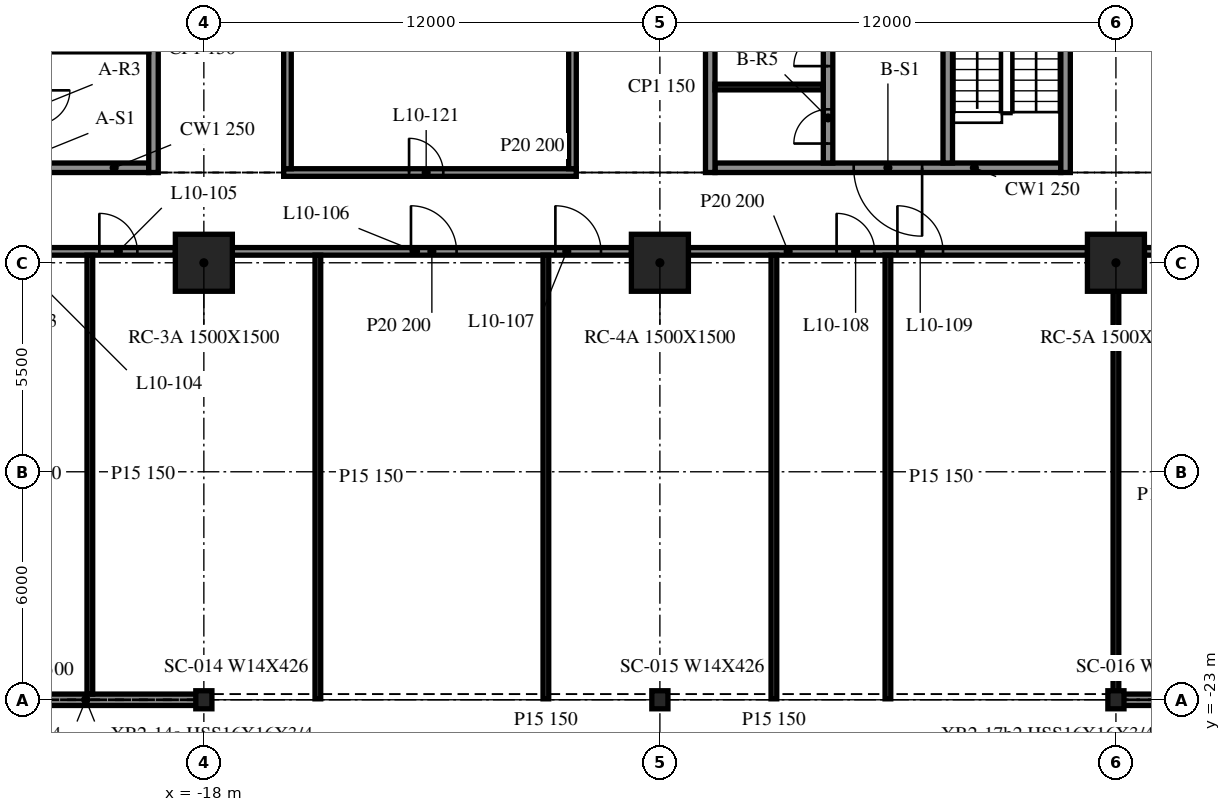
"""IFC4 building model, lengths in metres.
Left out: names, types, materials, properties, quantities, classifications, styles, units other than length and angle.
Written with IfcOpenShell. Run it as: python <this file> out.ifc"""

import sys

from ifc_helpers import new_model, si_unit, direction, frame, frame_2d, origin, origin_2d, place, context, subcontext, project, spatial, rectangle, i_section, extrude, element, fill, save


model = new_model("IFC4")
c1 = context("Model", 3, precision=1e-05, world=origin(), true_north=direction((0.0, 1.0)))
c2 = subcontext(c1, "Body", "Model", "MODEL_VIEW")
j1 = project(units=[si_unit("LENGTHUNIT", "METRE"), si_unit("PLANEANGLEUNIT", "RADIAN")], contexts=[c1])
p1 = place(None, origin())
s1 = spatial("IfcSite", under=j1, at=p1, CompositionType="ELEMENT")
p2 = place(p1, origin())
s2 = spatial("IfcBuilding", under=s1, at=p2, CompositionType="ELEMENT")
p3 = place(p2, frame((0.0, 0.0, 46.0)))
s3 = spatial("IfcBuildingStorey", under=s2, at=p3, CompositionType="ELEMENT", Elevation=46.0)
for number, where, z_axis, x_axis in (
    (1, (-18.0, -11.5, -0.34), (0.0, 0.0, 1.0), (1.0, 0.0, 0.0)),
    (2, (-6.0, -11.5, -0.34), (0.0, 0.0, 1.0), (1.0, 0.0, 0.0)),
    (3, (6.0, -11.5, -0.34), (0.0, 0.0, 1.0), (1.0, 0.0, 0.0)),
):
    element("IfcColumn", number, at=place(p3, frame(where, z_axis=z_axis, x_axis=x_axis)), inside=s3, PredefinedType="COLUMN", context=c2, shape_type="SweptSolid", body=[
        extrude(rectangle(XDim=1.5, YDim=1.5, at=origin_2d()), origin(), (0.0, 0.0, 1.0), 4.3),
    ])
for number, where, z_axis, x_axis in (
    (4, (-18.0, -23.0, -0.34), (0.0, 0.0, 1.0), (1.0, 0.0, 0.0)),
    (5, (-6.0, -23.0, -0.34), (0.0, 0.0, 1.0), (1.0, 0.0, 0.0)),
    (6, (6.0, -23.0, -0.34), (0.0, 0.0, 1.0), (1.0, 0.0, 0.0)),
):
    element("IfcColumn", number, at=place(p3, frame(where, z_axis=z_axis, x_axis=x_axis)), inside=s3, PredefinedType="COLUMN", context=c2, shape_type="SweptSolid", body=[
        extrude(i_section(OverallWidth=0.424, OverallDepth=0.475, WebThickness=0.048, FlangeThickness=0.077, at=origin_2d()), origin(), (0.0, 0.0, 1.0), 4.3),
    ])
for number, where, z_axis, x_axis in (
    (7, (-29.976, -23.0, 0.0), (0.0, 0.0, 1.0), (1.0, 0.0, 0.0)),
    (8, (6.024, -23.0, 0.0), (0.0, 0.0, 1.0), (1.0, 0.0, 0.0)),
):
    element("IfcWall", number, at=place(p3, frame(where, z_axis=z_axis, x_axis=x_axis)), inside=s3, PredefinedType="NOTDEFINED", context=c2, shape_type="SweptSolid", body=[
        extrude(rectangle(XDim=11.952, YDim=0.3, at=frame_2d((5.976, 0.0))), origin(), (0.0, 0.0, 1.0), 3.203),
    ])
p4 = place(p3, frame((-19.325, -9.125, 0.0), z_axis=(0.0, 0.0, 1.0), x_axis=(0.0, 1.0, 0.0)))
e9 = element("IfcWall", 9, at=p4, inside=s3, PredefinedType="SOLIDWALL", context=c2, shape_type="SweptSolid", body=[
    extrude(rectangle(XDim=24.25, YDim=0.25, at=frame_2d((12.125, 0.0))), origin(), (0.0, 0.0, 1.0), 3.96),
])
p5 = place(p3, frame((-19.45, -9.0, 0.0), z_axis=(0.0, 0.0, 1.0), x_axis=(-1.0, 0.0, 0.0)))
e10 = element("IfcWall", 10, at=p5, inside=s3, PredefinedType="SOLIDWALL", context=c2, shape_type="SweptSolid", body=[
    extrude(rectangle(XDim=9.1, YDim=0.25, at=frame_2d((4.55, 0.0))), origin(), (0.0, 0.0, 1.0), 3.96),
])
p6 = place(p5, frame((3.65, 0.0, 0.0)))
e11 = element("IfcOpeningElement", 11, at=p6, cuts=e10, PredefinedType="OPENING", context=c2, shape_type="SweptSolid", body=[
    extrude(rectangle(XDim=1.8, YDim=2.1, at=frame_2d((0.9, 1.05))), frame((0.0, 0.135, 0.0), z_axis=(0.0, -1.0, 0.0), x_axis=(1.0, 0.0, 0.0)), (0.0, 0.0, 1.0), 0.27),
])
for number, where, z_axis, x_axis in (
    (12, (-4.675, 15.125, 0.0), (0.0, 0.0, 1.0), (0.0, -1.0, 0.0)),
    (13, (4.675, -9.125, 0.0), (0.0, 0.0, 1.0), (0.0, 1.0, 0.0)),
):
    element("IfcWall", number, at=place(p3, frame(where, z_axis=z_axis, x_axis=x_axis)), inside=s3, PredefinedType="SOLIDWALL", context=c2, shape_type="SweptSolid", body=[
        extrude(rectangle(XDim=24.25, YDim=0.25, at=frame_2d((12.125, 0.0))), origin(), (0.0, 0.0, 1.0), 3.96),
    ])
p7 = place(p3, frame((4.55, -9.0, 0.0), z_axis=(0.0, 0.0, 1.0), x_axis=(-1.0, 0.0, 0.0)))
e14 = element("IfcWall", 14, at=p7, inside=s3, PredefinedType="SOLIDWALL", context=c2, shape_type="SweptSolid", body=[
    extrude(rectangle(XDim=9.1, YDim=0.25, at=frame_2d((4.55, 0.0))), origin(), (0.0, 0.0, 1.0), 3.96),
])
p8 = place(p7, frame((3.65, 0.0, 0.0)))
e15 = element("IfcOpeningElement", 15, at=p8, cuts=e14, PredefinedType="OPENING", context=c2, shape_type="SweptSolid", body=[
    extrude(rectangle(XDim=1.8, YDim=2.1, at=frame_2d((0.9, 1.05))), frame((0.0, 0.135, 0.0), z_axis=(0.0, -1.0, 0.0), x_axis=(1.0, 0.0, 0.0)), (0.0, 0.0, 1.0), 0.27),
])
p9 = place(p3, frame((-1.575, -8.875, 0.0), z_axis=(0.0, 0.0, 1.0), x_axis=(0.0, 1.0, 0.0)))
e16 = element("IfcWall", 16, at=p9, inside=s3, PredefinedType="SOLIDWALL", context=c2, shape_type="SweptSolid", body=[
    extrude(rectangle(XDim=23.75, YDim=0.25, at=frame_2d((11.875, 0.0))), origin(), (0.0, 0.0, 1.0), 3.96),
])
p10 = place(p9, frame((7.84, 0.0, 0.0)))
e17 = element("IfcOpeningElement", 17, at=p10, cuts=e16, PredefinedType="OPENING", context=c2, shape_type="SweptSolid", body=[
    extrude(rectangle(XDim=0.9, YDim=2.1, at=frame_2d((0.45, 1.05))), frame((0.0, 0.135, 0.0), z_axis=(0.0, -1.0, 0.0), x_axis=(1.0, 0.0, 0.0)), (0.0, 0.0, 1.0), 0.27),
])
p11 = place(p9, frame((11.479, 0.0, 0.0)))
e18 = element("IfcOpeningElement", 18, at=p11, cuts=e16, PredefinedType="OPENING", context=c2, shape_type="SweptSolid", body=[
    extrude(rectangle(XDim=0.9, YDim=2.1, at=frame_2d((0.45, 1.05))), frame((0.0, 0.135, 0.0), z_axis=(0.0, -1.0, 0.0), x_axis=(1.0, 0.0, 0.0)), (0.0, 0.0, 1.0), 0.27),
])
p12 = place(p9, frame((15.064, 0.0, 0.0)))
e19 = element("IfcOpeningElement", 19, at=p12, cuts=e16, PredefinedType="OPENING", context=c2, shape_type="SweptSolid", body=[
    extrude(rectangle(XDim=0.9, YDim=2.1, at=frame_2d((0.45, 1.05))), frame((0.0, 0.135, 0.0), z_axis=(0.0, -1.0, 0.0), x_axis=(1.0, 0.0, 0.0)), (0.0, 0.0, 1.0), 0.27),
])
p13 = place(p9, frame((0.512, 0.0, 0.0)))
e20 = element("IfcOpeningElement", 20, at=p13, cuts=e16, PredefinedType="OPENING", context=c2, shape_type="SweptSolid", body=[
    extrude(rectangle(XDim=0.9, YDim=2.1, at=frame_2d((0.45, 1.05))), frame((0.0, 0.135, 0.0), z_axis=(0.0, -1.0, 0.0), x_axis=(1.0, 0.0, 0.0)), (0.0, 0.0, 1.0), 0.27),
])
p14 = place(p9, frame((2.55, 0.0, 0.0)))
e21 = element("IfcOpeningElement", 21, at=p14, cuts=e16, PredefinedType="OPENING", context=c2, shape_type="SweptSolid", body=[
    extrude(rectangle(XDim=0.9, YDim=2.1, at=frame_2d((0.45, 1.05))), frame((0.0, 0.135, 0.0), z_axis=(0.0, -1.0, 0.0), x_axis=(1.0, 0.0, 0.0)), (0.0, 0.0, 1.0), 0.27),
])
p15 = place(p9, frame((4.587, 0.0, 0.0)))
e22 = element("IfcOpeningElement", 22, at=p15, cuts=e16, PredefinedType="OPENING", context=c2, shape_type="SweptSolid", body=[
    extrude(rectangle(XDim=0.9, YDim=2.1, at=frame_2d((0.45, 1.05))), frame((0.0, 0.135, 0.0), z_axis=(0.0, -1.0, 0.0), x_axis=(1.0, 0.0, 0.0)), (0.0, 0.0, 1.0), 0.27),
])
p16 = place(p9, frame((19.262, 0.0, 0.0)))
e23 = element("IfcOpeningElement", 23, at=p16, cuts=e16, PredefinedType="OPENING", context=c2, shape_type="SweptSolid", body=[
    extrude(rectangle(XDim=0.9, YDim=2.1, at=frame_2d((0.45, 1.05))), frame((0.0, 0.135, 0.0), z_axis=(0.0, -1.0, 0.0), x_axis=(1.0, 0.0, 0.0)), (0.0, 0.0, 1.0), 0.27),
])
p17 = place(p9, frame((22.337, 0.0, 0.0)))
e24 = element("IfcOpeningElement", 24, at=p17, cuts=e16, PredefinedType="OPENING", context=c2, shape_type="SweptSolid", body=[
    extrude(rectangle(XDim=0.9, YDim=2.1, at=frame_2d((0.45, 1.05))), frame((0.0, 0.135, 0.0), z_axis=(0.0, -1.0, 0.0), x_axis=(1.0, 0.0, 0.0)), (0.0, 0.0, 1.0), 0.27),
])
p18 = place(p3, frame((1.575, -8.875, 0.0), z_axis=(0.0, 0.0, 1.0), x_axis=(0.0, 1.0, 0.0)))
e25 = element("IfcWall", 25, at=p18, inside=s3, PredefinedType="SOLIDWALL", context=c2, shape_type="SweptSolid", body=[
    extrude(rectangle(XDim=6.25, YDim=0.25, at=frame_2d((3.125, 0.0))), origin(), (0.0, 0.0, 1.0), 3.96),
])
p19 = place(p18, frame((4.85, 0.0, 0.0)))
e26 = element("IfcOpeningElement", 26, at=p19, cuts=e25, PredefinedType="OPENING", context=c2, shape_type="SweptSolid", body=[
    extrude(rectangle(XDim=1.0, YDim=2.1, at=frame_2d((0.5, 1.05))), frame((0.0, 0.135, 0.0), z_axis=(0.0, -1.0, 0.0), x_axis=(1.0, 0.0, 0.0)), (0.0, 0.0, 1.0), 0.27),
])
p20 = place(p3, frame((-4.55, -6.875, 0.0), z_axis=(0.0, 0.0, 1.0), x_axis=(1.0, 0.0, 0.0)))
e27 = element("IfcWall", 27, at=p20, inside=s3, PredefinedType="PARTITIONING", context=c2, shape_type="SweptSolid", body=[
    extrude(rectangle(XDim=2.85, YDim=0.15, at=frame_2d((1.425, 0.0))), origin(), (0.0, 0.0, 1.0), 3.96),
])
p21 = place(p3, frame((-29.25, -11.2, 0.0), z_axis=(0.0, 0.0, 1.0), x_axis=(1.0, 0.0, 0.0)))
e28 = element("IfcWall", 28, at=p21, inside=s3, PredefinedType="PARTITIONING", context=c2, shape_type="SweptSolid", body=[
    extrude(rectangle(XDim=10.5, YDim=0.2, at=frame_2d((5.25, 0.0))), origin(), (0.0, 0.0, 1.0), 3.96),
])
p22 = place(p21, frame((3.7, 0.0, 0.0)))
e29 = element("IfcOpeningElement", 29, at=p22, cuts=e28, PredefinedType="OPENING", context=c2, shape_type="SweptSolid", body=[
    extrude(rectangle(XDim=1.2, YDim=2.1, at=frame_2d((0.6, 1.05))), frame((0.0, 0.11, 0.0), z_axis=(0.0, -1.0, 0.0), x_axis=(1.0, 0.0, 0.0)), (0.0, 0.0, 1.0), 0.22),
])
p23 = place(p21, frame((5.5, 0.0, 0.0)))
e30 = element("IfcOpeningElement", 30, at=p23, cuts=e28, PredefinedType="OPENING", context=c2, shape_type="SweptSolid", body=[
    extrude(rectangle(XDim=1.2, YDim=2.1, at=frame_2d((0.6, 1.05))), frame((0.0, 0.11, 0.0), z_axis=(0.0, -1.0, 0.0), x_axis=(1.0, 0.0, 0.0)), (0.0, 0.0, 1.0), 0.22),
])
p24 = place(p21, frame((8.5, 0.0, 0.0)))
e31 = element("IfcOpeningElement", 31, at=p24, cuts=e28, PredefinedType="OPENING", context=c2, shape_type="SweptSolid", body=[
    extrude(rectangle(XDim=1.0, YDim=2.1, at=frame_2d((0.5, 1.05))), frame((0.0, 0.11, 0.0), z_axis=(0.0, -1.0, 0.0), x_axis=(1.0, 0.0, 0.0)), (0.0, 0.0, 1.0), 0.22),
])
p25 = place(p3, frame((-17.25, -11.2, 0.0), z_axis=(0.0, 0.0, 1.0), x_axis=(1.0, 0.0, 0.0)))
e32 = element("IfcWall", 32, at=p25, inside=s3, PredefinedType="PARTITIONING", context=c2, shape_type="SweptSolid", body=[
    extrude(rectangle(XDim=10.5, YDim=0.2, at=frame_2d((5.25, 0.0))), origin(), (0.0, 0.0, 1.0), 3.96),
])
p26 = place(p25, frame((4.7, 0.0, 0.0)))
e33 = element("IfcOpeningElement", 33, at=p26, cuts=e32, PredefinedType="OPENING", context=c2, shape_type="SweptSolid", body=[
    extrude(rectangle(XDim=1.2, YDim=2.1, at=frame_2d((0.6, 1.05))), frame((0.0, 0.11, 0.0), z_axis=(0.0, -1.0, 0.0), x_axis=(1.0, 0.0, 0.0)), (0.0, 0.0, 1.0), 0.22),
])
p27 = place(p25, frame((8.5, 0.0, 0.0)))
e34 = element("IfcOpeningElement", 34, at=p27, cuts=e32, PredefinedType="OPENING", context=c2, shape_type="SweptSolid", body=[
    extrude(rectangle(XDim=1.2, YDim=2.1, at=frame_2d((0.6, 1.05))), frame((0.0, 0.11, 0.0), z_axis=(0.0, -1.0, 0.0), x_axis=(1.0, 0.0, 0.0)), (0.0, 0.0, 1.0), 0.22),
])
p28 = place(p3, frame((-5.25, -11.2, 0.0), z_axis=(0.0, 0.0, 1.0), x_axis=(1.0, 0.0, 0.0)))
e35 = element("IfcWall", 35, at=p28, inside=s3, PredefinedType="PARTITIONING", context=c2, shape_type="SweptSolid", body=[
    extrude(rectangle(XDim=10.5, YDim=0.2, at=frame_2d((5.25, 0.0))), origin(), (0.0, 0.0, 1.0), 3.96),
])
p29 = place(p28, frame((3.9, 0.0, 0.0)))
e36 = element("IfcOpeningElement", 36, at=p29, cuts=e35, PredefinedType="OPENING", context=c2, shape_type="SweptSolid", body=[
    extrude(rectangle(XDim=1.0, YDim=2.1, at=frame_2d((0.5, 1.05))), frame((0.0, 0.11, 0.0), z_axis=(0.0, -1.0, 0.0), x_axis=(1.0, 0.0, 0.0)), (0.0, 0.0, 1.0), 0.22),
])
p30 = place(p28, frame((5.5, 0.0, 0.0)))
e37 = element("IfcOpeningElement", 37, at=p30, cuts=e35, PredefinedType="OPENING", context=c2, shape_type="SweptSolid", body=[
    extrude(rectangle(XDim=1.2, YDim=2.1, at=frame_2d((0.6, 1.05))), frame((0.0, 0.11, 0.0), z_axis=(0.0, -1.0, 0.0), x_axis=(1.0, 0.0, 0.0)), (0.0, 0.0, 1.0), 0.22),
])
p31 = place(p3, frame((6.75, -11.2, 0.0), z_axis=(0.0, 0.0, 1.0), x_axis=(1.0, 0.0, 0.0)))
e38 = element("IfcWall", 38, at=p31, inside=s3, PredefinedType="PARTITIONING", context=c2, shape_type="SweptSolid", body=[
    extrude(rectangle(XDim=10.5, YDim=0.2, at=frame_2d((5.25, 0.0))), origin(), (0.0, 0.0, 1.0), 3.96),
])
p32 = place(p31, frame((3.7, 0.0, 0.0)))
e39 = element("IfcOpeningElement", 39, at=p32, cuts=e38, PredefinedType="OPENING", context=c2, shape_type="SweptSolid", body=[
    extrude(rectangle(XDim=1.2, YDim=2.1, at=frame_2d((0.6, 1.05))), frame((0.0, 0.11, 0.0), z_axis=(0.0, -1.0, 0.0), x_axis=(1.0, 0.0, 0.0)), (0.0, 0.0, 1.0), 0.22),
])
p33 = place(p31, frame((5.5, 0.0, 0.0)))
e40 = element("IfcOpeningElement", 40, at=p33, cuts=e38, PredefinedType="OPENING", context=c2, shape_type="SweptSolid", body=[
    extrude(rectangle(XDim=1.0, YDim=2.1, at=frame_2d((0.5, 1.05))), frame((0.0, 0.11, 0.0), z_axis=(0.0, -1.0, 0.0), x_axis=(1.0, 0.0, 0.0)), (0.0, 0.0, 1.0), 0.22),
])
p34 = place(p3, frame((-15.9, -9.125, 0.0), z_axis=(0.0, 0.0, 1.0), x_axis=(1.0, 0.0, 0.0)))
e41 = element("IfcWall", 41, at=p34, inside=s3, PredefinedType="PARTITIONING", context=c2, shape_type="SweptSolid", body=[
    extrude(rectangle(XDim=7.7, YDim=0.2, at=frame_2d((3.85, 0.0))), origin(), (0.0, 0.0, 1.0), 3.96),
])
p35 = place(p34, frame((3.3, 0.0, 0.0)))
e42 = element("IfcOpeningElement", 42, at=p35, cuts=e41, PredefinedType="OPENING", context=c2, shape_type="SweptSolid", body=[
    extrude(rectangle(XDim=0.9, YDim=2.1, at=frame_2d((0.45, 1.05))), frame((0.0, 0.11, 0.0), z_axis=(0.0, -1.0, 0.0), x_axis=(1.0, 0.0, 0.0)), (0.0, 0.0, 1.0), 0.22),
])
p36 = place(p3, frame((-21.0, -22.85, 0.0), z_axis=(0.0, 0.0, 1.0), x_axis=(0.0, 1.0, 0.0)))
e43 = element("IfcWall", 43, at=p36, inside=s3, PredefinedType="PARTITIONING", context=c2, shape_type="SweptSolid", body=[
    extrude(rectangle(XDim=11.55, YDim=0.15, at=frame_2d((5.775, 0.0))), origin(), (0.0, 0.0, 1.0), 3.96),
])
p37 = place(p3, frame((-15.8, -9.025, 0.0), z_axis=(0.0, 0.0, 1.0), x_axis=(0.0, 1.0, 0.0)))
e44 = element("IfcWall", 44, at=p37, inside=s3, PredefinedType="PARTITIONING", context=c2, shape_type="SweptSolid", body=[
    extrude(rectangle(XDim=24.05, YDim=0.2, at=frame_2d((12.025, 0.0))), origin(), (0.0, 0.0, 1.0), 3.96),
])
p38 = place(p37, frame((11.5, 0.0, 0.0)))
e45 = element("IfcOpeningElement", 45, at=p38, cuts=e44, PredefinedType="OPENING", context=c2, shape_type="SweptSolid", body=[
    extrude(rectangle(XDim=0.9, YDim=2.1, at=frame_2d((0.45, 1.05))), frame((0.0, 0.11, 0.0), z_axis=(0.0, -1.0, 0.0), x_axis=(1.0, 0.0, 0.0)), (0.0, 0.0, 1.0), 0.22),
])
for number, where, z_axis, x_axis in (
    (46, (-15.0, -22.975, 0.0), (0.0, 0.0, 1.0), (0.0, 1.0, 0.0)),
    (47, (-9.0, -22.975, 0.0), (0.0, 0.0, 1.0), (0.0, 1.0, 0.0)),
):
    element("IfcWall", number, at=place(p3, frame(where, z_axis=z_axis, x_axis=x_axis)), inside=s3, PredefinedType="PARTITIONING", context=c2, shape_type="SweptSolid", body=[
        extrude(rectangle(XDim=11.675, YDim=0.15, at=frame_2d((5.837, 0.0))), origin(), (0.0, 0.0, 1.0), 3.96),
    ])
p39 = place(p3, frame((-8.3, -9.025, 0.0), z_axis=(0.0, 0.0, 1.0), x_axis=(0.0, 1.0, 0.0)))
e48 = element("IfcWall", 48, at=p39, inside=s3, PredefinedType="PARTITIONING", context=c2, shape_type="SweptSolid", body=[
    extrude(rectangle(XDim=24.05, YDim=0.2, at=frame_2d((12.025, 0.0))), origin(), (0.0, 0.0, 1.0), 3.96),
])
for number, where, z_axis, x_axis in (
    (49, (-3.0, -22.975, 0.0), (0.0, 0.0, 1.0), (0.0, 1.0, 0.0)),
    (50, (0.0, -22.975, 0.0), (0.0, 0.0, 1.0), (0.0, 1.0, 0.0)),
):
    element("IfcWall", number, at=place(p3, frame(where, z_axis=z_axis, x_axis=x_axis)), inside=s3, PredefinedType="PARTITIONING", context=c2, shape_type="SweptSolid", body=[
        extrude(rectangle(XDim=11.675, YDim=0.15, at=frame_2d((5.837, 0.0))), origin(), (0.0, 0.0, 1.0), 3.96),
    ])
p40 = place(p3, frame((6.0, -22.975, 0.0), z_axis=(0.0, 0.0, 1.0), x_axis=(0.0, 1.0, 0.0)))
e51 = element("IfcWall", 51, at=p40, inside=s3, PredefinedType="PARTITIONING", context=c2, shape_type="SweptSolid", body=[
    extrude(rectangle(XDim=10.725, YDim=0.15, at=frame_2d((5.363, 0.0))), origin(), (0.0, 0.0, 1.0), 3.96),
])
p41 = place(p8, origin())
e52 = element("IfcDoor", 52, at=p41, inside=s3, OperationType="DOUBLE_DOOR_SINGLE_SWING", PredefinedType="DOOR", context=c2, shape_type="SweptSolid", body=[
    extrude(rectangle(XDim=1.8, YDim=2.1, at=frame_2d((0.9, 1.05))), frame((0.0, 0.025, 0.0), z_axis=(0.0, -1.0, 0.0), x_axis=(1.0, 0.0, 0.0)), (0.0, 0.0, 1.0), 0.05),
])
fill(e15, e52)
p42 = place(p13, origin())
e53 = element("IfcDoor", 53, at=p42, inside=s3, OperationType="SINGLE_SWING_LEFT", PredefinedType="DOOR", context=c2, shape_type="SweptSolid", body=[
    extrude(rectangle(XDim=0.9, YDim=2.1, at=frame_2d((0.45, 1.05))), frame((0.0, 0.025, 0.0), z_axis=(0.0, -1.0, 0.0), x_axis=(1.0, 0.0, 0.0)), (0.0, 0.0, 1.0), 0.05),
])
fill(e20, e53)
p43 = place(p14, origin())
e54 = element("IfcDoor", 54, at=p43, inside=s3, OperationType="SINGLE_SWING_RIGHT", PredefinedType="DOOR", context=c2, shape_type="SweptSolid", body=[
    extrude(rectangle(XDim=0.9, YDim=2.1, at=frame_2d((0.45, 1.05))), frame((0.0, 0.025, 0.0), z_axis=(0.0, -1.0, 0.0), x_axis=(1.0, 0.0, 0.0)), (0.0, 0.0, 1.0), 0.05),
])
fill(e21, e54)
p44 = place(p24, origin())
e55 = element("IfcDoor", 55, at=p44, inside=s3, OperationType="SINGLE_SWING_LEFT", PredefinedType="DOOR", context=c2, shape_type="SweptSolid", body=[
    extrude(rectangle(XDim=1.0, YDim=2.1, at=frame_2d((0.5, 1.05))), frame((0.0, 0.025, 0.0), z_axis=(0.0, -1.0, 0.0), x_axis=(1.0, 0.0, 0.0)), (0.0, 0.0, 1.0), 0.05),
])
fill(e31, e55)
p45 = place(p26, origin())
e56 = element("IfcDoor", 56, at=p45, inside=s3, OperationType="SINGLE_SWING_LEFT", PredefinedType="DOOR", context=c2, shape_type="SweptSolid", body=[
    extrude(rectangle(XDim=1.2, YDim=2.1, at=frame_2d((0.6, 1.05))), frame((0.0, 0.025, 0.0), z_axis=(0.0, -1.0, 0.0), x_axis=(1.0, 0.0, 0.0)), (0.0, 0.0, 1.0), 0.05),
])
fill(e33, e56)
p46 = place(p27, origin())
e57 = element("IfcDoor", 57, at=p46, inside=s3, OperationType="SINGLE_SWING_LEFT", PredefinedType="DOOR", context=c2, shape_type="SweptSolid", body=[
    extrude(rectangle(XDim=1.2, YDim=2.1, at=frame_2d((0.6, 1.05))), frame((0.0, 0.025, 0.0), z_axis=(0.0, -1.0, 0.0), x_axis=(1.0, 0.0, 0.0)), (0.0, 0.0, 1.0), 0.05),
])
fill(e34, e57)
p47 = place(p29, origin())
e58 = element("IfcDoor", 58, at=p47, inside=s3, OperationType="SINGLE_SWING_RIGHT", PredefinedType="DOOR", context=c2, shape_type="SweptSolid", body=[
    extrude(rectangle(XDim=1.0, YDim=2.1, at=frame_2d((0.5, 1.05))), frame((0.0, 0.025, 0.0), z_axis=(0.0, -1.0, 0.0), x_axis=(1.0, 0.0, 0.0)), (0.0, 0.0, 1.0), 0.05),
])
fill(e36, e58)
p48 = place(p30, origin())
e59 = element("IfcDoor", 59, at=p48, inside=s3, OperationType="SINGLE_SWING_LEFT", PredefinedType="DOOR", context=c2, shape_type="SweptSolid", body=[
    extrude(rectangle(XDim=1.2, YDim=2.1, at=frame_2d((0.6, 1.05))), frame((0.0, 0.025, 0.0), z_axis=(0.0, -1.0, 0.0), x_axis=(1.0, 0.0, 0.0)), (0.0, 0.0, 1.0), 0.05),
])
fill(e37, e59)
p49 = place(p35, origin())
e60 = element("IfcDoor", 60, at=p49, inside=s3, OperationType="SINGLE_SWING_LEFT", PredefinedType="DOOR", context=c2, shape_type="SweptSolid", body=[
    extrude(rectangle(XDim=0.9, YDim=2.1, at=frame_2d((0.45, 1.05))), frame((0.0, 0.025, 0.0), z_axis=(0.0, -1.0, 0.0), x_axis=(1.0, 0.0, 0.0)), (0.0, 0.0, 1.0), 0.05),
])
fill(e42, e60)
save(model, sys.argv[1])
